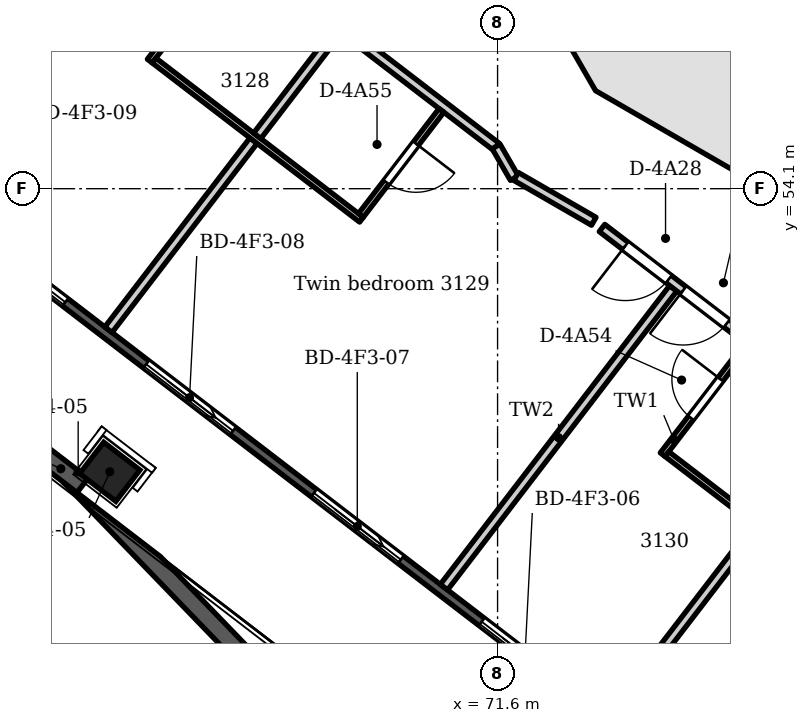
"""IFC4 building model, lengths in metres.
Left out: names, types, materials, properties, quantities, classifications, styles, units other than length and angle.
Written with IfcOpenShell. Run it as: python <this file> out.ifc"""

import sys

from ifc_helpers import new_model, si_unit, direction, frame, frame_2d, origin, origin_2d, place, context, subcontext, project, spatial, polyline, rectangle, outline, extrude, element, fill, save


model = new_model("IFC4")
c1 = context("Model", 3, precision=1e-05, world=origin(), true_north=direction((0.0, 1.0)))
c2 = subcontext(c1, "Body", "Model", "MODEL_VIEW")
j1 = project(units=[si_unit("LENGTHUNIT", "METRE"), si_unit("PLANEANGLEUNIT", "RADIAN")], contexts=[c1])
p1 = place(None, origin())
s1 = spatial("IfcSite", under=j1, at=p1, CompositionType="ELEMENT")
p2 = place(p1, origin())
s2 = spatial("IfcBuilding", under=s1, at=p2, CompositionType="ELEMENT")
p3 = place(p2, frame((0.0, 0.0, 124.2)))
s3 = spatial("IfcBuildingStorey", under=s2, at=p3, CompositionType="ELEMENT", Elevation=124.2)
p4 = place(p3, frame((71.117, 60.24, 0.0), z_axis=(0.0, 0.0, 1.0), x_axis=(0.500038571144, -0.866003133579, 0.0)))
e1 = element("IfcWall", 1, at=p4, inside=s3, PredefinedType="SHEAR", context=c2, shape_type="SweptSolid", body=[
    extrude(outline(polyline([(0.0, -0.45), (4.969, -0.45), (4.728, 0.45), (0.241, 0.45), (0.0, -0.45)])), origin(), (0.0, 0.0, 1.0), 3.6),
])
p5 = place(p4, frame((1.785, 0.0, 0.0)))
e2 = element("IfcOpeningElement", 2, at=p5, cuts=e1, PredefinedType="OPENING", context=c2, shape_type="SweptSolid", body=[
    extrude(rectangle(XDim=1.4, YDim=2.1, at=frame_2d((0.7, 1.05))), frame((0.0, 0.46, 0.0), z_axis=(0.0, -1.0, 0.0), x_axis=(1.0, 0.0, 0.0)), (0.0, 0.0, 1.0), 0.92),
])
p6 = place(p3, frame((73.437, 56.102, 0.0), z_axis=(0.0, 0.0, 1.0), x_axis=(0.866003133579, -0.500038571144, 0.0)))
e3 = element("IfcWall", 3, at=p6, inside=s3, PredefinedType="SHEAR", context=c2, shape_type="SweptSolid", body=[
    extrude(outline(polyline([(0.0, -0.45), (4.969, -0.45), (4.728, 0.45), (0.241, 0.45), (0.0, -0.45)])), origin(), (0.0, 0.0, 1.0), 3.6),
])
p7 = place(p6, frame((0.896, 0.0, 0.0)))
e4 = element("IfcOpeningElement", 4, at=p7, cuts=e3, PredefinedType="OPENING", context=c2, shape_type="SweptSolid", body=[
    extrude(rectangle(XDim=0.9, YDim=2.1, at=frame_2d((0.45, 1.05))), frame((0.0, 0.46, 0.0), z_axis=(0.0, -1.0, 0.0), x_axis=(1.0, 0.0, 0.0)), (0.0, 0.0, 1.0), 0.92),
])
p8 = place(p6, frame((3.185, 0.0, 0.0)))
e5 = element("IfcOpeningElement", 5, at=p8, cuts=e3, PredefinedType="OPENING", context=c2, shape_type="SweptSolid", body=[
    extrude(rectangle(XDim=0.9, YDim=2.1, at=frame_2d((0.45, 1.05))), frame((0.0, 0.46, 0.0), z_axis=(0.0, -1.0, 0.0), x_axis=(1.0, 0.0, 0.0)), (0.0, 0.0, 1.0), 0.92),
])
p9 = place(p3, frame((65.223, 49.445, -0.35), z_axis=(0.0, 0.0, 1.0), x_axis=(-0.793353340291, 0.608761429009, 0.0)))
e6 = element("IfcColumn", 6, at=p9, inside=s3, PredefinedType="COLUMN", context=c2, shape_type="SweptSolid", body=[
    extrude(rectangle(XDim=0.75, YDim=0.65, at=origin_2d()), origin(), (0.0, 0.0, 1.0), 3.95),
])
p10 = place(p3, frame((87.225, 34.786, 0.0), z_axis=(0.0, 0.0, 1.0), x_axis=(-0.793353605974, 0.608761082764, 0.0)))
e7 = element("IfcWall", 7, at=p10, inside=s3, PredefinedType="SOLIDWALL", context=c2, shape_type="SweptSolid", body=[
    extrude(outline(polyline([(0.149, 0.075), (0.149, -0.075), (45.057, -0.075), (45.057, 0.075), (0.149, 0.075)])), origin(), (0.0, 0.0, 1.0), 3.3),
])
p11 = place(p10, frame((1.239, 0.0, 0.0)))
e8 = element("IfcOpeningElement", 8, at=p11, cuts=e7, PredefinedType="OPENING", context=c2, shape_type="SweptSolid", body=[
    extrude(rectangle(XDim=1.8, YDim=2.6, at=frame_2d((0.9, 1.3))), frame((0.0, 0.085, 0.0), z_axis=(0.0, -1.0, 0.0), x_axis=(1.0, 0.0, 0.0)), (0.0, 0.0, 1.0), 0.17),
])
p12 = place(p10, frame((4.316, 0.0, 0.0)))
e9 = element("IfcOpeningElement", 9, at=p12, cuts=e7, PredefinedType="OPENING", context=c2, shape_type="SweptSolid", body=[
    extrude(rectangle(XDim=1.8, YDim=2.6, at=frame_2d((0.9, 1.3))), frame((0.0, 0.085, 0.0), z_axis=(0.0, -1.0, 0.0), x_axis=(1.0, 0.0, 0.0)), (0.0, 0.0, 1.0), 0.17),
])
p13 = place(p10, frame((7.793, 0.0, 0.0)))
e10 = element("IfcOpeningElement", 10, at=p13, cuts=e7, PredefinedType="OPENING", context=c2, shape_type="SweptSolid", body=[
    extrude(rectangle(XDim=1.8, YDim=2.6, at=frame_2d((0.9, 1.3))), frame((0.0, 0.085, 0.0), z_axis=(0.0, -1.0, 0.0), x_axis=(1.0, 0.0, 0.0)), (0.0, 0.0, 1.0), 0.17),
])
p14 = place(p10, frame((11.271, 0.0, 0.0)))
e11 = element("IfcOpeningElement", 11, at=p14, cuts=e7, PredefinedType="OPENING", context=c2, shape_type="SweptSolid", body=[
    extrude(rectangle(XDim=1.8, YDim=2.6, at=frame_2d((0.9, 1.3))), frame((0.0, 0.085, 0.0), z_axis=(0.0, -1.0, 0.0), x_axis=(1.0, 0.0, 0.0)), (0.0, 0.0, 1.0), 0.17),
])
p15 = place(p10, frame((14.748, 0.0, 0.0)))
e12 = element("IfcOpeningElement", 12, at=p15, cuts=e7, PredefinedType="OPENING", context=c2, shape_type="SweptSolid", body=[
    extrude(rectangle(XDim=1.8, YDim=2.6, at=frame_2d((0.9, 1.3))), frame((0.0, 0.085, 0.0), z_axis=(0.0, -1.0, 0.0), x_axis=(1.0, 0.0, 0.0)), (0.0, 0.0, 1.0), 0.17),
])
p16 = place(p10, frame((18.226, 0.0, 0.0)))
e13 = element("IfcOpeningElement", 13, at=p16, cuts=e7, PredefinedType="OPENING", context=c2, shape_type="SweptSolid", body=[
    extrude(rectangle(XDim=1.8, YDim=2.6, at=frame_2d((0.9, 1.3))), frame((0.0, 0.085, 0.0), z_axis=(0.0, -1.0, 0.0), x_axis=(1.0, 0.0, 0.0)), (0.0, 0.0, 1.0), 0.17),
])
p17 = place(p10, frame((21.703, 0.0, 0.0)))
e14 = element("IfcOpeningElement", 14, at=p17, cuts=e7, PredefinedType="OPENING", context=c2, shape_type="SweptSolid", body=[
    extrude(rectangle(XDim=1.8, YDim=2.6, at=frame_2d((0.9, 1.3))), frame((0.0, 0.085, 0.0), z_axis=(0.0, -1.0, 0.0), x_axis=(1.0, 0.0, 0.0)), (0.0, 0.0, 1.0), 0.17),
])
p18 = place(p10, frame((25.18, 0.0, 0.0)))
e15 = element("IfcOpeningElement", 15, at=p18, cuts=e7, PredefinedType="OPENING", context=c2, shape_type="SweptSolid", body=[
    extrude(rectangle(XDim=1.8, YDim=2.6, at=frame_2d((0.9, 1.3))), frame((0.0, 0.085, 0.0), z_axis=(0.0, -1.0, 0.0), x_axis=(1.0, 0.0, 0.0)), (0.0, 0.0, 1.0), 0.17),
])
p19 = place(p10, frame((28.658, 0.0, 0.0)))
e16 = element("IfcOpeningElement", 16, at=p19, cuts=e7, PredefinedType="OPENING", context=c2, shape_type="SweptSolid", body=[
    extrude(rectangle(XDim=1.8, YDim=2.6, at=frame_2d((0.9, 1.3))), frame((0.0, 0.085, 0.0), z_axis=(0.0, -1.0, 0.0), x_axis=(1.0, 0.0, 0.0)), (0.0, 0.0, 1.0), 0.17),
])
p20 = place(p10, frame((32.135, 0.0, 0.0)))
e17 = element("IfcOpeningElement", 17, at=p20, cuts=e7, PredefinedType="OPENING", context=c2, shape_type="SweptSolid", body=[
    extrude(rectangle(XDim=1.8, YDim=2.6, at=frame_2d((0.9, 1.3))), frame((0.0, 0.085, 0.0), z_axis=(0.0, -1.0, 0.0), x_axis=(1.0, 0.0, 0.0)), (0.0, 0.0, 1.0), 0.17),
])
p21 = place(p10, frame((35.613, 0.0, 0.0)))
e18 = element("IfcOpeningElement", 18, at=p21, cuts=e7, PredefinedType="OPENING", context=c2, shape_type="SweptSolid", body=[
    extrude(rectangle(XDim=1.8, YDim=2.6, at=frame_2d((0.9, 1.3))), frame((0.0, 0.085, 0.0), z_axis=(0.0, -1.0, 0.0), x_axis=(1.0, 0.0, 0.0)), (0.0, 0.0, 1.0), 0.17),
])
p22 = place(p10, frame((39.09, 0.0, 0.0)))
e19 = element("IfcOpeningElement", 19, at=p22, cuts=e7, PredefinedType="OPENING", context=c2, shape_type="SweptSolid", body=[
    extrude(rectangle(XDim=1.8, YDim=2.6, at=frame_2d((0.9, 1.3))), frame((0.0, 0.085, 0.0), z_axis=(0.0, -1.0, 0.0), x_axis=(1.0, 0.0, 0.0)), (0.0, 0.0, 1.0), 0.17),
])
p23 = place(p10, frame((42.167, 0.0, 0.0)))
e20 = element("IfcOpeningElement", 20, at=p23, cuts=e7, PredefinedType="OPENING", context=c2, shape_type="SweptSolid", body=[
    extrude(rectangle(XDim=1.8, YDim=2.6, at=frame_2d((0.9, 1.3))), frame((0.0, 0.085, 0.0), z_axis=(0.0, -1.0, 0.0), x_axis=(1.0, 0.0, 0.0)), (0.0, 0.0, 1.0), 0.17),
])
p24 = place(p3, origin())
e21 = element("IfcWall", 21, at=p24, inside=s3, PredefinedType="PARAPET", context=c2, shape_type="SweptSolid", body=[
    extrude(outline(polyline([(64.446, 49.285), (85.042, 27.956), (85.138, 28.289), (66.056, 48.049), (64.446, 49.285)])), origin(), (0.0, 0.0, 1.0), 1.1),
])
p25 = place(p3, origin())
e22 = element("IfcWall", 22, at=p25, inside=s3, PredefinedType="PARAPET", context=c2, shape_type="SweptSolid", body=[
    extrude(outline(polyline([(64.152, 49.888), (63.97, 49.65), (64.684, 49.102), (64.866, 49.34), (64.152, 49.888)])), origin(), (0.0, 0.0, 1.0), 1.1),
])
p26 = place(p3, frame((58.042, 65.176, 0.0), z_axis=(0.0, 0.0, 1.0), x_axis=(0.793390311924, -0.608713243609, 0.0)))
e23 = element("IfcWall", 23, at=p26, inside=s3, PredefinedType="PARTITIONING", context=c2, shape_type="SweptSolid", body=[
    extrude(rectangle(XDim=17.064, YDim=0.15, at=frame_2d((8.532, 0.0))), origin(), (0.0, 0.0, 1.0), 2.8),
])
p27 = place(p26, frame((7.029, 0.0, 0.0)))
e24 = element("IfcOpeningElement", 24, at=p27, cuts=e23, PredefinedType="OPENING", context=c2, shape_type="SweptSolid", body=[
    extrude(rectangle(XDim=0.9, YDim=2.1, at=frame_2d((0.45, 1.05))), frame((0.0, 0.085, 0.0), z_axis=(0.0, -1.0, 0.0), x_axis=(1.0, 0.0, 0.0)), (0.0, 0.0, 1.0), 0.17),
])
p28 = place(p26, frame((3.551, 0.0, 0.0)))
e25 = element("IfcOpeningElement", 25, at=p28, cuts=e23, PredefinedType="OPENING", context=c2, shape_type="SweptSolid", body=[
    extrude(rectangle(XDim=0.9, YDim=2.1, at=frame_2d((0.45, 1.05))), frame((0.0, 0.085, 0.0), z_axis=(0.0, -1.0, 0.0), x_axis=(1.0, 0.0, 0.0)), (0.0, 0.0, 1.0), 0.17),
])
p29 = place(p3, frame((65.2, 51.781, 0.0), z_axis=(0.0, 0.0, 1.0), x_axis=(0.608783231907, 0.793336609863, 0.0)))
e26 = element("IfcWall", 26, at=p29, inside=s3, PredefinedType="PARTITIONING", context=c2, shape_type="SweptSolid", body=[
    extrude(rectangle(XDim=3.92, YDim=0.15, at=frame_2d((1.96, 0.0))), origin(), (0.0, 0.0, 1.0), 3.3),
])
p30 = place(p3, frame((65.881, 56.199, 0.0), z_axis=(0.0, 0.0, 1.0), x_axis=(0.608652294224, 0.793437070432, 0.0)))
e27 = element("IfcWall", 27, at=p30, inside=s3, PredefinedType="PARTITIONING", context=c2, shape_type="SweptSolid", body=[
    extrude(rectangle(XDim=2.275, YDim=0.1, at=frame_2d((1.138, 0.0))), origin(), (0.0, 0.0, 1.0), 3.3),
])
p31 = place(p30, frame((0.762, 0.0, 0.0)))
e28 = element("IfcOpeningElement", 28, at=p31, cuts=e27, PredefinedType="OPENING", context=c2, shape_type="SweptSolid", body=[
    extrude(rectangle(XDim=0.8, YDim=2.1, at=frame_2d((0.4, 1.05))), frame((0.0, 0.06, 0.0), z_axis=(0.0, -1.0, 0.0), x_axis=(1.0, 0.0, 0.0)), (0.0, 0.0, 1.0), 0.12),
])
p32 = place(p3, frame((65.951, 56.208, 0.0), z_axis=(0.0, 0.0, 1.0), x_axis=(0.793301035436, -0.60882958796, 0.0)))
e29 = element("IfcWall", 29, at=p32, inside=s3, PredefinedType="PARTITIONING", context=c2, shape_type="SweptSolid", body=[
    extrude(rectangle(XDim=4.3, YDim=0.1, at=frame_2d((2.15, 0.0))), origin(), (0.0, 0.0, 1.0), 3.3),
])
p33 = place(p3, frame((67.647, 54.97, 0.0), z_axis=(0.0, 0.0, 1.0), x_axis=(0.608674216197, 0.79342025342, 0.0)))
e30 = element("IfcWall", 30, at=p33, inside=s3, PredefinedType="PARTITIONING", context=c2, shape_type="SweptSolid", body=[
    extrude(rectangle(XDim=2.175, YDim=0.15, at=frame_2d((1.088, 0.0))), origin(), (0.0, 0.0, 1.0), 3.3),
])
p34 = place(p3, frame((69.352, 53.661, 0.0), z_axis=(0.0, 0.0, 1.0), x_axis=(0.608744865415, 0.793366049709, 0.0)))
e31 = element("IfcWall", 31, at=p34, inside=s3, PredefinedType="PARTITIONING", context=c2, shape_type="SweptSolid", body=[
    extrude(rectangle(XDim=2.175, YDim=0.1, at=frame_2d((1.088, 0.0))), origin(), (0.0, 0.0, 1.0), 3.3),
])
p35 = place(p34, frame((0.688, 0.0, 0.0)))
e32 = element("IfcOpeningElement", 32, at=p35, cuts=e31, PredefinedType="OPENING", context=c2, shape_type="SweptSolid", body=[
    extrude(rectangle(XDim=0.8, YDim=2.1, at=frame_2d((0.4, 1.05))), frame((0.0, 0.06, 0.0), z_axis=(0.0, -1.0, 0.0), x_axis=(1.0, 0.0, 0.0)), (0.0, 0.0, 1.0), 0.12),
])
p36 = place(p3, frame((70.718, 47.548, 0.0), z_axis=(0.0, 0.0, 1.0), x_axis=(0.608712047114, 0.79339122991, 0.0)))
e33 = element("IfcWall", 33, at=p36, inside=s3, PredefinedType="PARTITIONING", context=c2, shape_type="SweptSolid", body=[
    extrude(rectangle(XDim=6.193, YDim=0.15, at=frame_2d((3.097, 0.0))), origin(), (0.0, 0.0, 1.0), 3.3),
])
p37 = place(p3, frame((71.576, 54.795, 0.0), z_axis=(0.0, 0.0, 1.0), x_axis=(0.499675599625, -0.866212615435, 0.0)))
e34 = element("IfcWall", 34, at=p37, inside=s3, PredefinedType="PARTITIONING", context=c2, shape_type="SweptSolid", body=[
    extrude(rectangle(XDim=0.602, YDim=0.15, at=frame_2d((0.301, 0.0))), origin(), (0.0, 0.0, 1.0), 3.3),
])
p38 = place(p3, frame((71.904, 54.302, 0.0), z_axis=(0.0, 0.0, 1.0), x_axis=(0.866086395302, -0.499894344709, 0.0)))
e35 = element("IfcWall", 35, at=p38, inside=s3, PredefinedType="PARTITIONING", context=c2, shape_type="SweptSolid", body=[
    extrude(rectangle(XDim=1.475, YDim=0.15, at=frame_2d((0.738, 0.0))), origin(), (0.0, 0.0, 1.0), 3.3),
])
p39 = place(p3, frame((73.318, 53.454, 0.0), z_axis=(0.0, 0.0, 1.0), x_axis=(0.793337765411, -0.60878172605, 0.0)))
e36 = element("IfcWall", 36, at=p39, inside=s3, PredefinedType="PARTITIONING", context=c2, shape_type="SweptSolid", body=[
    extrude(rectangle(XDim=18.995, YDim=0.15, at=frame_2d((9.498, 0.0))), origin(), (0.0, 0.0, 1.0), 2.8),
])
p40 = place(p39, frame((14.393, 0.0, 0.0)))
e37 = element("IfcOpeningElement", 37, at=p40, cuts=e36, PredefinedType="OPENING", context=c2, shape_type="SweptSolid", body=[
    extrude(rectangle(XDim=0.9, YDim=2.1, at=frame_2d((0.45, 1.05))), frame((0.0, 0.085, 0.0), z_axis=(0.0, -1.0, 0.0), x_axis=(1.0, 0.0, 0.0)), (0.0, 0.0, 1.0), 0.17),
])
p41 = place(p39, frame((10.523, 0.0, 0.0)))
e38 = element("IfcOpeningElement", 38, at=p41, cuts=e36, PredefinedType="OPENING", context=c2, shape_type="SweptSolid", body=[
    extrude(rectangle(XDim=1.0, YDim=2.1, at=frame_2d((0.5, 1.05))), frame((0.0, 0.085, 0.0), z_axis=(0.0, -1.0, 0.0), x_axis=(1.0, 0.0, 0.0)), (0.0, 0.0, 1.0), 0.17),
])
p42 = place(p39, frame((7.438, 0.0, 0.0)))
e39 = element("IfcOpeningElement", 39, at=p42, cuts=e36, PredefinedType="OPENING", context=c2, shape_type="SweptSolid", body=[
    extrude(rectangle(XDim=0.9, YDim=2.1, at=frame_2d((0.45, 1.05))), frame((0.0, 0.085, 0.0), z_axis=(0.0, -1.0, 0.0), x_axis=(1.0, 0.0, 0.0)), (0.0, 0.0, 1.0), 0.17),
])
p43 = place(p39, frame((1.683, 0.0, 0.0)))
e40 = element("IfcOpeningElement", 40, at=p43, cuts=e36, PredefinedType="OPENING", context=c2, shape_type="SweptSolid", body=[
    extrude(rectangle(XDim=0.9, YDim=2.1, at=frame_2d((0.45, 1.05))), frame((0.0, 0.085, 0.0), z_axis=(0.0, -1.0, 0.0), x_axis=(1.0, 0.0, 0.0)), (0.0, 0.0, 1.0), 0.17),
])
p44 = place(p39, frame((0.483, 0.0, 0.0)))
e41 = element("IfcOpeningElement", 41, at=p44, cuts=e36, PredefinedType="OPENING", context=c2, shape_type="SweptSolid", body=[
    extrude(rectangle(XDim=0.9, YDim=2.1, at=frame_2d((0.45, 1.05))), frame((0.0, 0.085, 0.0), z_axis=(0.0, -1.0, 0.0), x_axis=(1.0, 0.0, 0.0)), (0.0, 0.0, 1.0), 0.17),
])
p45 = place(p3, frame((73.476, 45.431, 0.0), z_axis=(0.0, 0.0, 1.0), x_axis=(0.608903577747, 0.793244245493, 0.0)))
e42 = element("IfcWall", 42, at=p45, inside=s3, PredefinedType="PARTITIONING", context=c2, shape_type="SweptSolid", body=[
    extrude(rectangle(XDim=3.919, YDim=0.15, at=frame_2d((1.959, 0.0))), origin(), (0.0, 0.0, 1.0), 3.3),
])
p46 = place(p3, frame((74.316, 49.726, 0.0), z_axis=(0.0, 0.0, 1.0), x_axis=(0.608652294224, 0.793437070432, 0.0)))
e43 = element("IfcWall", 43, at=p46, inside=s3, PredefinedType="PARTITIONING", context=c2, shape_type="SweptSolid", body=[
    extrude(rectangle(XDim=2.275, YDim=0.1, at=frame_2d((1.138, 0.0))), origin(), (0.0, 0.0, 1.0), 3.3),
])
p47 = place(p46, frame((0.762, 0.0, 0.0)))
e44 = element("IfcOpeningElement", 44, at=p47, cuts=e43, PredefinedType="OPENING", context=c2, shape_type="SweptSolid", body=[
    extrude(rectangle(XDim=0.8, YDim=2.1, at=frame_2d((0.4, 1.05))), frame((0.0, 0.06, 0.0), z_axis=(0.0, -1.0, 0.0), x_axis=(1.0, 0.0, 0.0)), (0.0, 0.0, 1.0), 0.12),
])
p48 = place(p3, frame((74.386, 49.736, 0.0), z_axis=(0.0, 0.0, 1.0), x_axis=(0.793363466367, -0.608748232222, 0.0)))
e45 = element("IfcWall", 45, at=p48, inside=s3, PredefinedType="PARTITIONING", context=c2, shape_type="SweptSolid", body=[
    extrude(rectangle(XDim=3.9, YDim=0.1, at=frame_2d((1.95, 0.0))), origin(), (0.0, 0.0, 1.0), 3.3),
])
p49 = place(p16, origin())
e46 = element("IfcDoor", 46, at=p49, inside=s3, OperationType="SLIDING_TO_LEFT", PredefinedType="DOOR", context=c2, shape_type="SweptSolid", body=[
    extrude(rectangle(XDim=1.8, YDim=2.6, at=frame_2d((0.9, 1.3))), frame((0.0, 0.025, 0.0), z_axis=(0.0, -1.0, 0.0), x_axis=(1.0, 0.0, 0.0)), (0.0, 0.0, 1.0), 0.05),
])
fill(e13, e46)
p50 = place(p17, origin())
e47 = element("IfcDoor", 47, at=p50, inside=s3, OperationType="SLIDING_TO_LEFT", PredefinedType="DOOR", context=c2, shape_type="SweptSolid", body=[
    extrude(rectangle(XDim=1.8, YDim=2.6, at=frame_2d((0.9, 1.3))), frame((0.0, 0.025, 0.0), z_axis=(0.0, -1.0, 0.0), x_axis=(1.0, 0.0, 0.0)), (0.0, 0.0, 1.0), 0.05),
])
fill(e14, e47)
p51 = place(p18, origin())
e48 = element("IfcDoor", 48, at=p51, inside=s3, OperationType="SLIDING_TO_LEFT", PredefinedType="DOOR", context=c2, shape_type="SweptSolid", body=[
    extrude(rectangle(XDim=1.8, YDim=2.6, at=frame_2d((0.9, 1.3))), frame((0.0, 0.025, 0.0), z_axis=(0.0, -1.0, 0.0), x_axis=(1.0, 0.0, 0.0)), (0.0, 0.0, 1.0), 0.05),
])
fill(e15, e48)
p52 = place(p19, origin())
e49 = element("IfcDoor", 49, at=p52, inside=s3, OperationType="SLIDING_TO_LEFT", PredefinedType="DOOR", context=c2, shape_type="SweptSolid", body=[
    extrude(rectangle(XDim=1.8, YDim=2.6, at=frame_2d((0.9, 1.3))), frame((0.0, 0.025, 0.0), z_axis=(0.0, -1.0, 0.0), x_axis=(1.0, 0.0, 0.0)), (0.0, 0.0, 1.0), 0.05),
])
fill(e16, e49)
p53 = place(p43, frame((0.9, 0.0, 0.0), z_axis=(0.0, 0.0, 1.0), x_axis=(-1.0, 0.0, 0.0)))
e50 = element("IfcDoor", 50, at=p53, inside=s3, OperationType="SINGLE_SWING_RIGHT", PredefinedType="DOOR", context=c2, shape_type="SweptSolid", body=[
    extrude(rectangle(XDim=0.9, YDim=2.1, at=frame_2d((0.45, 1.05))), frame((0.0, 0.025, 0.0), z_axis=(0.0, -1.0, 0.0), x_axis=(1.0, 0.0, 0.0)), (0.0, 0.0, 1.0), 0.05),
])
fill(e40, e50)
p54 = place(p44, frame((0.9, 0.0, 0.0), z_axis=(0.0, 0.0, 1.0), x_axis=(-1.0, 0.0, 0.0)))
e51 = element("IfcDoor", 51, at=p54, inside=s3, OperationType="SINGLE_SWING_RIGHT", PredefinedType="DOOR", context=c2, shape_type="SweptSolid", body=[
    extrude(rectangle(XDim=0.9, YDim=2.1, at=frame_2d((0.45, 1.05))), frame((0.0, 0.025, 0.0), z_axis=(0.0, -1.0, 0.0), x_axis=(1.0, 0.0, 0.0)), (0.0, 0.0, 1.0), 0.05),
])
fill(e41, e51)
p55 = place(p47, origin())
e52 = element("IfcDoor", 52, at=p55, inside=s3, OperationType="SINGLE_SWING_RIGHT", PredefinedType="DOOR", context=c2, shape_type="SweptSolid", body=[
    extrude(rectangle(XDim=0.8, YDim=2.1, at=frame_2d((0.4, 1.05))), frame((0.0, 0.025, 0.0), z_axis=(0.0, -1.0, 0.0), x_axis=(1.0, 0.0, 0.0)), (0.0, 0.0, 1.0), 0.05),
])
fill(e44, e52)
p56 = place(p35, frame((0.8, 0.0, 0.0), z_axis=(0.0, 0.0, 1.0), x_axis=(-1.0, 0.0, 0.0)))
e53 = element("IfcDoor", 53, at=p56, inside=s3, OperationType="SINGLE_SWING_LEFT", PredefinedType="DOOR", context=c2, shape_type="SweptSolid", body=[
    extrude(rectangle(XDim=0.8, YDim=2.1, at=frame_2d((0.4, 1.05))), frame((0.0, 0.025, 0.0), z_axis=(0.0, -1.0, 0.0), x_axis=(1.0, 0.0, 0.0)), (0.0, 0.0, 1.0), 0.05),
])
fill(e32, e53)
p57 = place(p7, origin())
e54 = element("IfcDoor", 54, at=p57, inside=s3, OperationType="SINGLE_SWING_LEFT", PredefinedType="DOOR", context=c2, shape_type="SweptSolid", body=[
    extrude(rectangle(XDim=0.9, YDim=2.1, at=frame_2d((0.45, 1.05))), frame((0.0, 0.175, 0.0), z_axis=(0.0, -1.0, 0.0), x_axis=(1.0, 0.0, 0.0)), (0.0, 0.0, 1.0), 0.05),
])
fill(e4, e54)
save(model, sys.argv[1])
